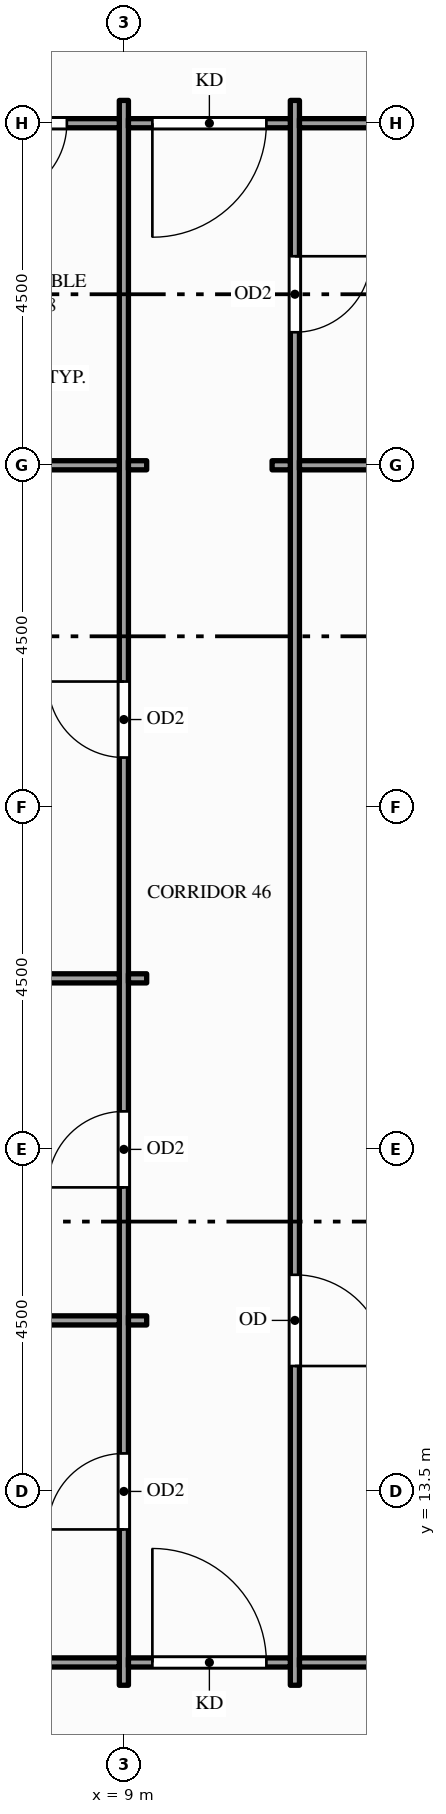
"""IFC4 building model, lengths in metres.
Left out: names, types, materials, properties, quantities, classifications, styles, units other than length and angle.
Written with IfcOpenShell. Run it as: python <this file> out.ifc"""

import sys

from ifc_helpers import new_model, si_unit, direction, frame, frame_2d, origin, place, context, subcontext, project, spatial, rectangle, extrude, element, fill, save


model = new_model("IFC4")
c1 = context("Model", 3, precision=1e-05, world=origin(), true_north=direction((0.0, 1.0)))
c2 = subcontext(c1, "Body", "Model", "MODEL_VIEW")
j1 = project(units=[si_unit("LENGTHUNIT", "METRE"), si_unit("PLANEANGLEUNIT", "RADIAN")], contexts=[c1])
p1 = place(None, origin())
s1 = spatial("IfcSite", under=j1, at=p1, CompositionType="ELEMENT")
p2 = place(p1, origin())
s2 = spatial("IfcBuilding", under=s1, at=p2, CompositionType="ELEMENT")
p3 = place(p2, frame((0.0, 0.0, 199.0)))
s3 = spatial("IfcBuildingStorey", under=s2, at=p3, CompositionType="ELEMENT", Elevation=199.0)
p4 = place(p3, frame((9.0, 10.95, 0.0), z_axis=(0.0, 0.0, 1.0), x_axis=(0.0, 1.0, 0.0)))
e1 = element("IfcWall", 1, at=p4, inside=s3, PredefinedType="PARTITIONING", context=c2, shape_type="SweptSolid", body=[
    extrude(rectangle(XDim=20.85, YDim=0.12, at=frame_2d((10.425, 0.0))), origin(), (0.0, 0.0, 1.0), 2.6),
])
p5 = place(p4, frame((2.05, 0.0, 0.0)))
e2 = element("IfcOpeningElement", 2, at=p5, cuts=e1, PredefinedType="OPENING", context=c2, shape_type="SweptSolid", body=[
    extrude(rectangle(XDim=1.0, YDim=2.1, at=frame_2d((0.5, 1.05))), frame((0.0, 0.07, 0.0), z_axis=(0.0, -1.0, 0.0), x_axis=(1.0, 0.0, 0.0)), (0.0, 0.0, 1.0), 0.14),
])
p6 = place(p4, frame((6.55, 0.0, 0.0)))
e3 = element("IfcOpeningElement", 3, at=p6, cuts=e1, PredefinedType="OPENING", context=c2, shape_type="SweptSolid", body=[
    extrude(rectangle(XDim=1.0, YDim=2.1, at=frame_2d((0.5, 1.05))), frame((0.0, 0.07, 0.0), z_axis=(0.0, -1.0, 0.0), x_axis=(1.0, 0.0, 0.0)), (0.0, 0.0, 1.0), 0.14),
])
p7 = place(p4, frame((12.205, 0.0, 0.0)))
e4 = element("IfcOpeningElement", 4, at=p7, cuts=e1, PredefinedType="OPENING", context=c2, shape_type="SweptSolid", body=[
    extrude(rectangle(XDim=1.0, YDim=2.1, at=frame_2d((0.5, 1.05))), frame((0.0, 0.07, 0.0), z_axis=(0.0, -1.0, 0.0), x_axis=(1.0, 0.0, 0.0)), (0.0, 0.0, 1.0), 0.14),
])
p8 = place(p3, frame((11.25, 10.95, 0.0), z_axis=(0.0, 0.0, 1.0), x_axis=(0.0, 1.0, 0.0)))
e5 = element("IfcWall", 5, at=p8, inside=s3, PredefinedType="PARTITIONING", context=c2, shape_type="SweptSolid", body=[
    extrude(rectangle(XDim=20.85, YDim=0.12, at=frame_2d((10.425, 0.0))), origin(), (0.0, 0.0, 1.0), 2.6),
])
p9 = place(p8, frame((17.8, 0.0, 0.0)))
e6 = element("IfcOpeningElement", 6, at=p9, cuts=e5, PredefinedType="OPENING", context=c2, shape_type="SweptSolid", body=[
    extrude(rectangle(XDim=1.0, YDim=2.1, at=frame_2d((0.5, 1.05))), frame((0.0, 0.07, 0.0), z_axis=(0.0, -1.0, 0.0), x_axis=(1.0, 0.0, 0.0)), (0.0, 0.0, 1.0), 0.14),
])
p10 = place(p8, frame((4.2, 0.0, 0.0)))
e7 = element("IfcOpeningElement", 7, at=p10, cuts=e5, PredefinedType="OPENING", context=c2, shape_type="SweptSolid", body=[
    extrude(rectangle(XDim=1.2, YDim=2.1, at=frame_2d((0.6, 1.05))), frame((0.0, 0.07, 0.0), z_axis=(0.0, -1.0, 0.0), x_axis=(1.0, 0.0, 0.0)), (0.0, 0.0, 1.0), 0.14),
])
p11 = place(p3, frame((0.15, 11.25, 0.0), z_axis=(0.0, 0.0, 1.0), x_axis=(1.0, 0.0, 0.0)))
e8 = element("IfcWall", 8, at=p11, inside=s3, PredefinedType="PARTITIONING", context=c2, shape_type="SweptSolid", body=[
    extrude(rectangle(XDim=8.79, YDim=0.12, at=frame_2d((4.395, 0.0))), origin(), (0.0, 0.0, 1.0), 2.87),
])
p12 = place(p3, frame((9.06, 11.25, 0.0), z_axis=(0.0, 0.0, 1.0), x_axis=(1.0, 0.0, 0.0)))
e9 = element("IfcWall", 9, at=p12, inside=s3, PredefinedType="PARTITIONING", context=c2, shape_type="SweptSolid", body=[
    extrude(rectangle(XDim=2.13, YDim=0.12, at=frame_2d((1.065, 0.0))), origin(), (0.0, 0.0, 1.0), 2.87),
])
p13 = place(p12, frame((0.315, 0.0, 0.0)))
e10 = element("IfcOpeningElement", 10, at=p13, cuts=e9, PredefinedType="OPENING", context=c2, shape_type="SweptSolid", body=[
    extrude(rectangle(XDim=1.5, YDim=2.1, at=frame_2d((0.75, 1.05))), frame((0.0, 0.07, 0.0), z_axis=(0.0, -1.0, 0.0), x_axis=(1.0, 0.0, 0.0)), (0.0, 0.0, 1.0), 0.14),
])
p14 = place(p3, frame((11.31, 11.25, 0.0), z_axis=(0.0, 0.0, 1.0), x_axis=(1.0, 0.0, 0.0)))
e11 = element("IfcWall", 11, at=p14, inside=s3, PredefinedType="PARTITIONING", context=c2, shape_type="SweptSolid", body=[
    extrude(rectangle(XDim=13.38, YDim=0.12, at=frame_2d((6.69, 0.0))), origin(), (0.0, 0.0, 1.0), 2.76),
])
p15 = place(p14, frame((3.54, 0.0, 0.0)))
e12 = element("IfcOpeningElement", 12, at=p15, cuts=e11, PredefinedType="OPENING", context=c2, shape_type="SweptSolid", body=[
    extrude(rectangle(XDim=1.8, YDim=2.1, at=frame_2d((0.9, 1.05))), frame((0.0, 0.07, 0.0), z_axis=(0.0, -1.0, 0.0), x_axis=(1.0, 0.0, 0.0)), (0.0, 0.0, 1.0), 0.14),
])
p16 = place(p3, frame((0.15, 15.75, 0.0), z_axis=(0.0, 0.0, 1.0), x_axis=(1.0, 0.0, 0.0)))
e13 = element("IfcWall", 13, at=p16, inside=s3, PredefinedType="PARTITIONING", context=c2, shape_type="SweptSolid", body=[
    extrude(rectangle(XDim=8.79, YDim=0.12, at=frame_2d((4.395, 0.0))), origin(), (0.0, 0.0, 1.0), 2.87),
])
p17 = place(p3, frame((9.06, 15.75, 0.0), z_axis=(0.0, 0.0, 1.0), x_axis=(1.0, 0.0, 0.0)))
e14 = element("IfcWall", 14, at=p17, inside=s3, PredefinedType="PARTITIONING", context=c2, shape_type="SweptSolid", body=[
    extrude(rectangle(XDim=0.24, YDim=0.12, at=frame_2d((0.12, 0.0))), origin(), (0.0, 0.0, 1.0), 2.87),
])
p18 = place(p3, frame((0.15, 20.25, 0.0), z_axis=(0.0, 0.0, 1.0), x_axis=(1.0, 0.0, 0.0)))
e15 = element("IfcWall", 15, at=p18, inside=s3, PredefinedType="PARTITIONING", context=c2, shape_type="SweptSolid", body=[
    extrude(rectangle(XDim=8.79, YDim=0.12, at=frame_2d((4.395, 0.0))), origin(), (0.0, 0.0, 1.0), 2.87),
])
p19 = place(p3, frame((9.06, 20.25, 0.0), z_axis=(0.0, 0.0, 1.0), x_axis=(1.0, 0.0, 0.0)))
e16 = element("IfcWall", 16, at=p19, inside=s3, PredefinedType="PARTITIONING", context=c2, shape_type="SweptSolid", body=[
    extrude(rectangle(XDim=0.24, YDim=0.12, at=frame_2d((0.12, 0.0))), origin(), (0.0, 0.0, 1.0), 2.87),
])
p20 = place(p3, frame((6.56, 27.0, 0.0), z_axis=(0.0, 0.0, 1.0), x_axis=(1.0, 0.0, 0.0)))
e17 = element("IfcWall", 17, at=p20, inside=s3, PredefinedType="PARTITIONING", context=c2, shape_type="SweptSolid", body=[
    extrude(rectangle(XDim=2.38, YDim=0.12, at=frame_2d((1.19, 0.0))), origin(), (0.0, 0.0, 1.0), 2.87),
])
for number, where, z_axis, x_axis in (
    (18, (9.06, 27.0, 0.0), (0.0, 0.0, 1.0), (1.0, 0.0, 0.0)),
    (19, (10.95, 27.0, 0.0), (0.0, 0.0, 1.0), (1.0, 0.0, 0.0)),
):
    element("IfcWall", number, at=place(p3, frame(where, z_axis=z_axis, x_axis=x_axis)), inside=s3, PredefinedType="PARTITIONING", context=c2, shape_type="SweptSolid", body=[
        extrude(rectangle(XDim=0.24, YDim=0.12, at=frame_2d((0.12, 0.0))), origin(), (0.0, 0.0, 1.0), 2.87),
    ])
p21 = place(p3, frame((11.31, 27.0, 0.0), z_axis=(0.0, 0.0, 1.0), x_axis=(1.0, 0.0, 0.0)))
e20 = element("IfcWall", 20, at=p21, inside=s3, PredefinedType="PARTITIONING", context=c2, shape_type="SweptSolid", body=[
    extrude(rectangle(XDim=12.54, YDim=0.12, at=frame_2d((6.27, 0.0))), origin(), (0.0, 0.0, 1.0), 2.87),
])
p22 = place(p3, frame((6.56, 31.5, 0.0), z_axis=(0.0, 0.0, 1.0), x_axis=(1.0, 0.0, 0.0)))
e21 = element("IfcWall", 21, at=p22, inside=s3, PredefinedType="PARTITIONING", context=c2, shape_type="SweptSolid", body=[
    extrude(rectangle(XDim=2.38, YDim=0.12, at=frame_2d((1.19, 0.0))), origin(), (0.0, 0.0, 1.0), 2.87),
])
p23 = place(p22, frame((0.69, 0.0, 0.0)))
e22 = element("IfcOpeningElement", 22, at=p23, cuts=e21, PredefinedType="OPENING", context=c2, shape_type="SweptSolid", body=[
    extrude(rectangle(XDim=1.0, YDim=2.1, at=frame_2d((0.5, 1.05))), frame((0.0, 0.07, 0.0), z_axis=(0.0, -1.0, 0.0), x_axis=(1.0, 0.0, 0.0)), (0.0, 0.0, 1.0), 0.14),
])
p24 = place(p3, frame((9.06, 31.5, 0.0), z_axis=(0.0, 0.0, 1.0), x_axis=(1.0, 0.0, 0.0)))
e23 = element("IfcWall", 23, at=p24, inside=s3, PredefinedType="PARTITIONING", context=c2, shape_type="SweptSolid", body=[
    extrude(rectangle(XDim=2.13, YDim=0.12, at=frame_2d((1.065, 0.0))), origin(), (0.0, 0.0, 1.0), 2.87),
])
p25 = place(p24, frame((0.315, 0.0, 0.0)))
e24 = element("IfcOpeningElement", 24, at=p25, cuts=e23, PredefinedType="OPENING", context=c2, shape_type="SweptSolid", body=[
    extrude(rectangle(XDim=1.5, YDim=2.1, at=frame_2d((0.75, 1.05))), frame((0.0, 0.07, 0.0), z_axis=(0.0, -1.0, 0.0), x_axis=(1.0, 0.0, 0.0)), (0.0, 0.0, 1.0), 0.14),
])
p26 = place(p3, frame((11.31, 31.5, 0.0), z_axis=(0.0, 0.0, 1.0), x_axis=(1.0, 0.0, 0.0)))
e25 = element("IfcWall", 25, at=p26, inside=s3, PredefinedType="PARTITIONING", context=c2, shape_type="SweptSolid", body=[
    extrude(rectangle(XDim=12.54, YDim=0.12, at=frame_2d((6.27, 0.0))), origin(), (0.0, 0.0, 1.0), 2.87),
])
p27 = place(p13, origin())
e26 = element("IfcDoor", 26, at=p27, inside=s3, OperationType="SINGLE_SWING_LEFT", PredefinedType="DOOR", context=c2, shape_type="SweptSolid", body=[
    extrude(rectangle(XDim=1.5, YDim=2.1, at=frame_2d((0.75, 1.05))), frame((0.0, 0.025, 0.0), z_axis=(0.0, -1.0, 0.0), x_axis=(1.0, 0.0, 0.0)), (0.0, 0.0, 1.0), 0.05),
])
fill(e10, e26)
p28 = place(p25, origin())
e27 = element("IfcDoor", 27, at=p28, inside=s3, OperationType="SINGLE_SWING_LEFT", PredefinedType="DOOR", context=c2, shape_type="SweptSolid", body=[
    extrude(rectangle(XDim=1.5, YDim=2.1, at=frame_2d((0.75, 1.05))), frame((0.0, 0.025, 0.0), z_axis=(0.0, -1.0, 0.0), x_axis=(1.0, 0.0, 0.0)), (0.0, 0.0, 1.0), 0.05),
])
fill(e24, e27)
p29 = place(p5, origin())
e28 = element("IfcDoor", 28, at=p29, inside=s3, OperationType="SINGLE_SWING_LEFT", PredefinedType="DOOR", context=c2, shape_type="SweptSolid", body=[
    extrude(rectangle(XDim=1.0, YDim=2.1, at=frame_2d((0.5, 1.05))), frame((0.0, 0.025, 0.0), z_axis=(0.0, -1.0, 0.0), x_axis=(1.0, 0.0, 0.0)), (0.0, 0.0, 1.0), 0.05),
])
fill(e2, e28)
p30 = place(p6, origin())
e29 = element("IfcDoor", 29, at=p30, inside=s3, OperationType="SINGLE_SWING_LEFT", PredefinedType="DOOR", context=c2, shape_type="SweptSolid", body=[
    extrude(rectangle(XDim=1.0, YDim=2.1, at=frame_2d((0.5, 1.05))), frame((0.0, 0.025, 0.0), z_axis=(0.0, -1.0, 0.0), x_axis=(1.0, 0.0, 0.0)), (0.0, 0.0, 1.0), 0.05),
])
fill(e3, e29)
p31 = place(p7, origin())
e30 = element("IfcDoor", 30, at=p31, inside=s3, OperationType="SINGLE_SWING_RIGHT", PredefinedType="DOOR", context=c2, shape_type="SweptSolid", body=[
    extrude(rectangle(XDim=1.0, YDim=2.1, at=frame_2d((0.5, 1.05))), frame((0.0, 0.025, 0.0), z_axis=(0.0, -1.0, 0.0), x_axis=(1.0, 0.0, 0.0)), (0.0, 0.0, 1.0), 0.05),
])
fill(e4, e30)
p32 = place(p23, origin())
e31 = element("IfcDoor", 31, at=p32, inside=s3, OperationType="SINGLE_SWING_LEFT", PredefinedType="DOOR", context=c2, shape_type="SweptSolid", body=[
    extrude(rectangle(XDim=1.0, YDim=2.1, at=frame_2d((0.5, 1.05))), frame((0.0, 0.025, 0.0), z_axis=(0.0, -1.0, 0.0), x_axis=(1.0, 0.0, 0.0)), (0.0, 0.0, 1.0), 0.05),
])
fill(e22, e31)
p33 = place(p9, origin())
e32 = element("IfcDoor", 32, at=p33, inside=s3, OperationType="SINGLE_SWING_RIGHT", PredefinedType="DOOR", context=c2, shape_type="SweptSolid", body=[
    extrude(rectangle(XDim=1.0, YDim=2.1, at=frame_2d((0.5, 1.05))), frame((0.0, 0.025, 0.0), z_axis=(0.0, -1.0, 0.0), x_axis=(1.0, 0.0, 0.0)), (0.0, 0.0, 1.0), 0.05),
])
fill(e6, e32)
p34 = place(p10, origin())
e33 = element("IfcDoor", 33, at=p34, inside=s3, OperationType="SINGLE_SWING_LEFT", PredefinedType="DOOR", context=c2, shape_type="SweptSolid", body=[
    extrude(rectangle(XDim=1.2, YDim=2.1, at=frame_2d((0.6, 1.05))), frame((0.0, 0.025, 0.0), z_axis=(0.0, -1.0, 0.0), x_axis=(1.0, 0.0, 0.0)), (0.0, 0.0, 1.0), 0.05),
])
fill(e7, e33)
save(model, sys.argv[1])
